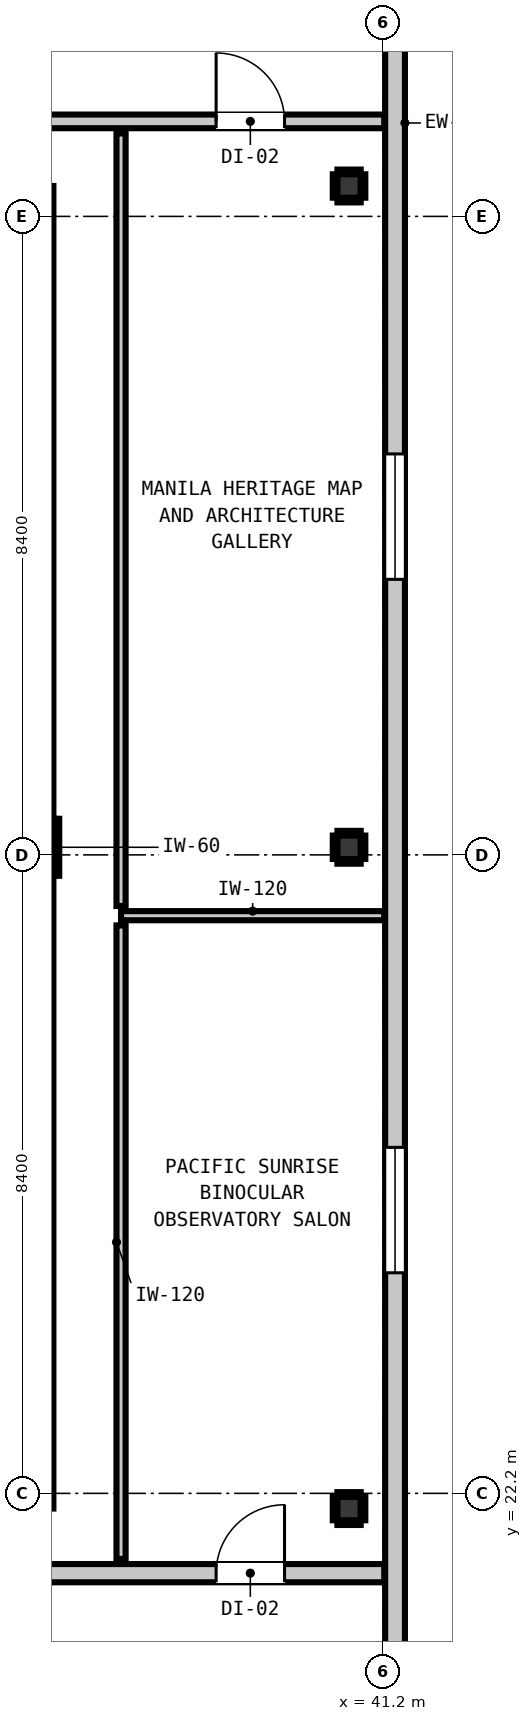
"""IFC4 building model, lengths in metres.
Left out: names, types, materials, properties, quantities, classifications, styles, units other than length and angle.
Written with IfcOpenShell. Run it as: python <this file> out.ifc"""

import sys

from ifc_helpers import new_model, si_unit, direction, frame, frame_2d, origin, origin_2d, place, context, subcontext, project, spatial, rectangle, i_section, extrude, element, fill, save


model = new_model("IFC4")
c1 = context("Model", 3, precision=1e-05, world=origin(), true_north=direction((0.0, 1.0)))
c2 = subcontext(c1, "Body", "Model", "MODEL_VIEW")
j1 = project(units=[si_unit("LENGTHUNIT", "METRE"), si_unit("PLANEANGLEUNIT", "RADIAN")], contexts=[c1])
p1 = place(None, origin())
s1 = spatial("IfcSite", under=j1, at=p1, CompositionType="ELEMENT")
p2 = place(p1, origin())
s2 = spatial("IfcBuilding", under=s1, at=p2, CompositionType="ELEMENT")
p3 = place(p2, frame((0.0, 0.0, 268.88)))
s3 = spatial("IfcBuildingStorey", under=s2, at=p3, CompositionType="ELEMENT", Elevation=268.88)
p4 = place(p3, frame((36.5, 30.7, 0.0), z_axis=(0.0, 0.0, 1.0), x_axis=(1.0, 0.0, 0.0)))
e1 = element("IfcColumn", 1, at=p4, inside=s3, PredefinedType="COLUMN", context=c2, shape_type="SweptSolid", body=[
    extrude(rectangle(XDim=0.75, YDim=0.75, at=origin_2d()), origin(), (0.0, 0.0, 1.0), 4.6),
])
p5 = place(p3, frame((36.46, 22.0, 0.0), z_axis=(0.0, 0.0, 1.0), x_axis=(0.0, 1.0, 0.0)))
e2 = element("IfcWall", 2, at=p5, inside=s3, PredefinedType="SHEAR", context=c2, shape_type="SweptSolid", body=[
    extrude(rectangle(XDim=8.32, YDim=0.8, at=frame_2d((4.16, 0.0))), origin(), (0.0, 0.0, 1.0), 4.6),
])
p6 = place(p3, frame((36.46, 31.08, 0.0), z_axis=(0.0, 0.0, 1.0), x_axis=(0.0, 1.0, 0.0)))
e3 = element("IfcWall", 3, at=p6, inside=s3, PredefinedType="SHEAR", context=c2, shape_type="SweptSolid", body=[
    extrude(rectangle(XDim=8.32, YDim=0.8, at=frame_2d((4.16, 0.0))), origin(), (0.0, 0.0, 1.0), 4.6),
])
for number, where, z_axis, x_axis in (
    (4, (40.75, 22.0, 0.0), (0.0, 0.0, 1.0), (1.0, 0.0, 0.0)),
    (5, (40.75, 30.7, 0.0), (0.0, 0.0, 1.0), (1.0, 0.0, 0.0)),
    (6, (40.75, 39.4, 0.0), (0.0, 0.0, 1.0), (1.0, 0.0, 0.0)),
):
    element("IfcColumn", number, at=place(p3, frame(where, z_axis=z_axis, x_axis=x_axis)), inside=s3, PredefinedType="COLUMN", context=c2, shape_type="SweptSolid", body=[
        extrude(i_section(OverallWidth=0.305, OverallDepth=0.308, WebThickness=0.01, FlangeThickness=0.015, at=origin_2d()), origin(), (0.0, 0.0, 1.0), 4.6),
    ])
p7 = place(p3, frame((41.355, 48.855, 0.0), z_axis=(0.0, 0.0, 1.0), x_axis=(0.0, -1.0, 0.0)))
e7 = element("IfcWall", 7, at=p7, inside=s3, PredefinedType="STANDARD", context=c2, shape_type="SweptSolid", body=[
    extrude(rectangle(XDim=30.31, YDim=0.26, at=frame_2d((15.155, 0.0))), origin(), (0.0, 0.0, 1.0), 4.38),
])
p8 = place(p7, frame((2.622, 0.0, 0.85)))
e8 = element("IfcOpeningElement", 8, at=p8, cuts=e7, PredefinedType="OPENING", context=c2, shape_type="SweptSolid", body=[
    extrude(rectangle(XDim=1.65, YDim=1.75, at=frame_2d((0.825, 0.875))), frame((0.0, 0.14, 0.0), z_axis=(0.0, -1.0, 0.0), x_axis=(1.0, 0.0, 0.0)), (0.0, 0.0, 1.0), 0.28),
])
p9 = place(p7, frame((22.103, 0.0, 0.85)))
e9 = element("IfcOpeningElement", 9, at=p9, cuts=e7, PredefinedType="OPENING", context=c2, shape_type="SweptSolid", body=[
    extrude(rectangle(XDim=1.65, YDim=1.75, at=frame_2d((0.825, 0.875))), frame((0.0, 0.14, 0.0), z_axis=(0.0, -1.0, 0.0), x_axis=(1.0, 0.0, 0.0)), (0.0, 0.0, 1.0), 0.28),
])
p10 = place(p7, frame((12.98, 0.0, 0.85)))
e10 = element("IfcOpeningElement", 10, at=p10, cuts=e7, PredefinedType="OPENING", context=c2, shape_type="SweptSolid", body=[
    extrude(rectangle(XDim=1.65, YDim=1.75, at=frame_2d((0.825, 0.875))), frame((0.0, 0.14, 0.0), z_axis=(0.0, -1.0, 0.0), x_axis=(1.0, 0.0, 0.0)), (0.0, 0.0, 1.0), 0.28),
])
p11 = place(p3, frame((13.012, 21.15, 0.0), z_axis=(0.0, 0.0, 1.0), x_axis=(1.0, 0.0, 0.0)))
e11 = element("IfcWall", 11, at=p11, inside=s3, PredefinedType="PARTITIONING", context=c2, shape_type="SweptSolid", body=[
    extrude(rectangle(XDim=28.201, YDim=0.24, at=frame_2d((14.101, 0.0))), origin(), (0.0, 0.0, 1.0), 4.38),
])
p12 = place(p11, frame((5.198, 0.0, 0.0)))
e12 = element("IfcOpeningElement", 12, at=p12, cuts=e11, PredefinedType="OPENING", context=c2, shape_type="SweptSolid", body=[
    extrude(rectangle(XDim=1.1, YDim=2.15, at=frame_2d((0.55, 1.075))), frame((0.0, 0.13, 0.0), z_axis=(0.0, -1.0, 0.0), x_axis=(1.0, 0.0, 0.0)), (0.0, 0.0, 1.0), 0.26),
])
p13 = place(p11, frame((25.989, 0.0, 0.0)))
e13 = element("IfcOpeningElement", 13, at=p13, cuts=e11, PredefinedType="OPENING", context=c2, shape_type="SweptSolid", body=[
    extrude(rectangle(XDim=0.9, YDim=2.1, at=frame_2d((0.45, 1.05))), frame((0.0, 0.13, 0.0), z_axis=(0.0, -1.0, 0.0), x_axis=(1.0, 0.0, 0.0)), (0.0, 0.0, 1.0), 0.26),
])
p14 = place(p3, frame((4.587, 40.25, 0.0), z_axis=(0.0, 0.0, 1.0), x_axis=(1.0, 0.0, 0.0)))
e14 = element("IfcWall", 14, at=p14, inside=s3, PredefinedType="PARTITIONING", context=c2, shape_type="SweptSolid", body=[
    extrude(rectangle(XDim=36.626, YDim=0.18, at=frame_2d((18.313, 0.0))), origin(), (0.0, 0.0, 1.0), 4.38),
])
p15 = place(p14, frame((12.848, 0.0, 0.0)))
e15 = element("IfcOpeningElement", 15, at=p15, cuts=e14, PredefinedType="OPENING", context=c2, shape_type="SweptSolid", body=[
    extrude(rectangle(XDim=1.4, YDim=2.15, at=frame_2d((0.7, 1.075))), frame((0.0, 0.1, 0.0), z_axis=(0.0, -1.0, 0.0), x_axis=(1.0, 0.0, 0.0)), (0.0, 0.0, 1.0), 0.2),
])
p16 = place(p14, frame((5.863, 0.0, 0.0)))
e16 = element("IfcOpeningElement", 16, at=p16, cuts=e14, PredefinedType="OPENING", context=c2, shape_type="SweptSolid", body=[
    extrude(rectangle(XDim=1.4, YDim=2.15, at=frame_2d((0.7, 1.075))), frame((0.0, 0.1, 0.0), z_axis=(0.0, -1.0, 0.0), x_axis=(1.0, 0.0, 0.0)), (0.0, 0.0, 1.0), 0.2),
])
p17 = place(p14, frame((2.337, 0.0, 0.0)))
e17 = element("IfcOpeningElement", 17, at=p17, cuts=e14, PredefinedType="OPENING", context=c2, shape_type="SweptSolid", body=[
    extrude(rectangle(XDim=0.95, YDim=2.1, at=frame_2d((0.475, 1.05))), frame((0.0, 0.1, 0.0), z_axis=(0.0, -1.0, 0.0), x_axis=(1.0, 0.0, 0.0)), (0.0, 0.0, 1.0), 0.2),
])
p18 = place(p14, frame((34.414, 0.0, 0.0)))
e18 = element("IfcOpeningElement", 18, at=p18, cuts=e14, PredefinedType="OPENING", context=c2, shape_type="SweptSolid", body=[
    extrude(rectangle(XDim=0.9, YDim=2.1, at=frame_2d((0.45, 1.05))), frame((0.0, 0.1, 0.0), z_axis=(0.0, -1.0, 0.0), x_axis=(1.0, 0.0, 0.0)), (0.0, 0.0, 1.0), 0.2),
])
p19 = place(p3, frame((37.75, 29.8, 0.0), z_axis=(0.0, 0.0, 1.0), x_axis=(1.0, 0.0, 0.0)))
e19 = element("IfcWall", 19, at=p19, inside=s3, PredefinedType="PARTITIONING", context=c2, shape_type="SweptSolid", body=[
    extrude(rectangle(XDim=3.463, YDim=0.12, at=frame_2d((1.731, 0.0))), origin(), (0.0, 0.0, 1.0), 4.38),
])
p20 = place(p3, frame((37.75, 21.338, 0.0), z_axis=(0.0, 0.0, 1.0), x_axis=(0.0, 1.0, 0.0)))
e20 = element("IfcWall", 20, at=p20, inside=s3, PredefinedType="PARTITIONING", context=c2, shape_type="SweptSolid", body=[
    extrude(rectangle(XDim=8.334, YDim=0.12, at=frame_2d((4.167, 0.0))), origin(), (0.0, 0.0, 1.0), 4.38),
])
p21 = place(p3, frame((37.75, 29.928, 0.0), z_axis=(0.0, 0.0, 1.0), x_axis=(0.0, 1.0, 0.0)))
e21 = element("IfcWall", 21, at=p21, inside=s3, PredefinedType="PARTITIONING", context=c2, shape_type="SweptSolid", body=[
    extrude(rectangle(XDim=10.164, YDim=0.12, at=frame_2d((5.082, 0.0))), origin(), (0.0, 0.0, 1.0), 4.38),
])
p22 = place(p3, frame((36.907, 30.325, 0.0), z_axis=(0.0, 0.0, 1.0), x_axis=(0.0, 1.0, 0.0)))
e22 = element("IfcWall", 22, at=p22, inside=s3, PredefinedType="PARTITIONING", context=c2, shape_type="SweptSolid", body=[
    extrude(rectangle(XDim=0.75, YDim=0.06, at=frame_2d((0.375, 0.0))), origin(), (0.0, 0.0, 1.0), 1.45),
])
for number, where, z_axis, x_axis in (
    (23, (40.597, 21.814, 0.0), (0.0, 0.0, 1.0), (1.0, 0.0, 0.0)),
    (24, (40.597, 22.186, 0.0), (0.0, 0.0, 1.0), (1.0, 0.0, 0.0)),
):
    element("IfcWall", number, at=place(p3, frame(where, z_axis=z_axis, x_axis=x_axis)), inside=s3, PredefinedType="PARTITIONING", context=c2, shape_type="SweptSolid", body=[
        extrude(rectangle(XDim=0.306, YDim=0.06, at=frame_2d((0.153, 0.0))), origin(), (0.0, 0.0, 1.0), 1.45),
    ])
for number, where, z_axis, x_axis in (
    (25, (40.566, 21.846, 0.0), (0.0, 0.0, 1.0), (0.0, 1.0, 0.0)),
    (26, (40.934, 21.846, 0.0), (0.0, 0.0, 1.0), (0.0, 1.0, 0.0)),
):
    element("IfcWall", number, at=place(p3, frame(where, z_axis=z_axis, x_axis=x_axis)), inside=s3, PredefinedType="PARTITIONING", context=c2, shape_type="SweptSolid", body=[
        extrude(rectangle(XDim=0.308, YDim=0.06, at=frame_2d((0.154, 0.0))), origin(), (0.0, 0.0, 1.0), 1.45),
    ])
for number, where, z_axis, x_axis in (
    (27, (40.597, 30.514, 0.0), (0.0, 0.0, 1.0), (1.0, 0.0, 0.0)),
    (28, (40.597, 30.886, 0.0), (0.0, 0.0, 1.0), (1.0, 0.0, 0.0)),
):
    element("IfcWall", number, at=place(p3, frame(where, z_axis=z_axis, x_axis=x_axis)), inside=s3, PredefinedType="PARTITIONING", context=c2, shape_type="SweptSolid", body=[
        extrude(rectangle(XDim=0.306, YDim=0.06, at=frame_2d((0.153, 0.0))), origin(), (0.0, 0.0, 1.0), 1.45),
    ])
for number, where, z_axis, x_axis in (
    (29, (40.566, 30.546, 0.0), (0.0, 0.0, 1.0), (0.0, 1.0, 0.0)),
    (30, (40.934, 30.546, 0.0), (0.0, 0.0, 1.0), (0.0, 1.0, 0.0)),
):
    element("IfcWall", number, at=place(p3, frame(where, z_axis=z_axis, x_axis=x_axis)), inside=s3, PredefinedType="PARTITIONING", context=c2, shape_type="SweptSolid", body=[
        extrude(rectangle(XDim=0.308, YDim=0.06, at=frame_2d((0.154, 0.0))), origin(), (0.0, 0.0, 1.0), 1.45),
    ])
for number, where, z_axis, x_axis in (
    (31, (40.597, 39.214, 0.0), (0.0, 0.0, 1.0), (1.0, 0.0, 0.0)),
    (32, (40.597, 39.586, 0.0), (0.0, 0.0, 1.0), (1.0, 0.0, 0.0)),
):
    element("IfcWall", number, at=place(p3, frame(where, z_axis=z_axis, x_axis=x_axis)), inside=s3, PredefinedType="PARTITIONING", context=c2, shape_type="SweptSolid", body=[
        extrude(rectangle(XDim=0.306, YDim=0.06, at=frame_2d((0.153, 0.0))), origin(), (0.0, 0.0, 1.0), 1.45),
    ])
for number, where, z_axis, x_axis in (
    (33, (40.566, 39.246, 0.0), (0.0, 0.0, 1.0), (0.0, 1.0, 0.0)),
    (34, (40.934, 39.246, 0.0), (0.0, 0.0, 1.0), (0.0, 1.0, 0.0)),
):
    element("IfcWall", number, at=place(p3, frame(where, z_axis=z_axis, x_axis=x_axis)), inside=s3, PredefinedType="PARTITIONING", context=c2, shape_type="SweptSolid", body=[
        extrude(rectangle(XDim=0.308, YDim=0.06, at=frame_2d((0.154, 0.0))), origin(), (0.0, 0.0, 1.0), 1.45),
    ])
p23 = place(p9, origin())
e35 = element("IfcWindow", 35, at=p23, inside=s3, PartitioningType="SINGLE_PANEL", PredefinedType="WINDOW", context=c2, shape_type="SweptSolid", body=[
    extrude(rectangle(XDim=1.65, YDim=1.75, at=frame_2d((0.825, 0.875))), frame((0.0, 0.03, 0.0), z_axis=(0.0, -1.0, 0.0), x_axis=(1.0, 0.0, 0.0)), (0.0, 0.0, 1.0), 0.06),
])
fill(e9, e35)
p24 = place(p10, origin())
e36 = element("IfcWindow", 36, at=p24, inside=s3, PartitioningType="SINGLE_PANEL", PredefinedType="WINDOW", context=c2, shape_type="SweptSolid", body=[
    extrude(rectangle(XDim=1.65, YDim=1.75, at=frame_2d((0.825, 0.875))), frame((0.0, 0.03, 0.0), z_axis=(0.0, -1.0, 0.0), x_axis=(1.0, 0.0, 0.0)), (0.0, 0.0, 1.0), 0.06),
])
fill(e10, e36)
p25 = place(p13, origin())
e37 = element("IfcDoor", 37, at=p25, inside=s3, OperationType="SINGLE_SWING_RIGHT", PredefinedType="DOOR", context=c2, shape_type="SweptSolid", body=[
    extrude(rectangle(XDim=0.9, YDim=2.1, at=frame_2d((0.45, 1.05))), frame((0.0, 0.025, 0.0), z_axis=(0.0, -1.0, 0.0), x_axis=(1.0, 0.0, 0.0)), (0.0, 0.0, 1.0), 0.05),
])
fill(e13, e37)
p26 = place(p18, origin())
e38 = element("IfcDoor", 38, at=p26, inside=s3, OperationType="SINGLE_SWING_LEFT", PredefinedType="DOOR", context=c2, shape_type="SweptSolid", body=[
    extrude(rectangle(XDim=0.9, YDim=2.1, at=frame_2d((0.45, 1.05))), frame((0.0, 0.025, 0.0), z_axis=(0.0, -1.0, 0.0), x_axis=(1.0, 0.0, 0.0)), (0.0, 0.0, 1.0), 0.05),
])
fill(e18, e38)
save(model, sys.argv[1])
